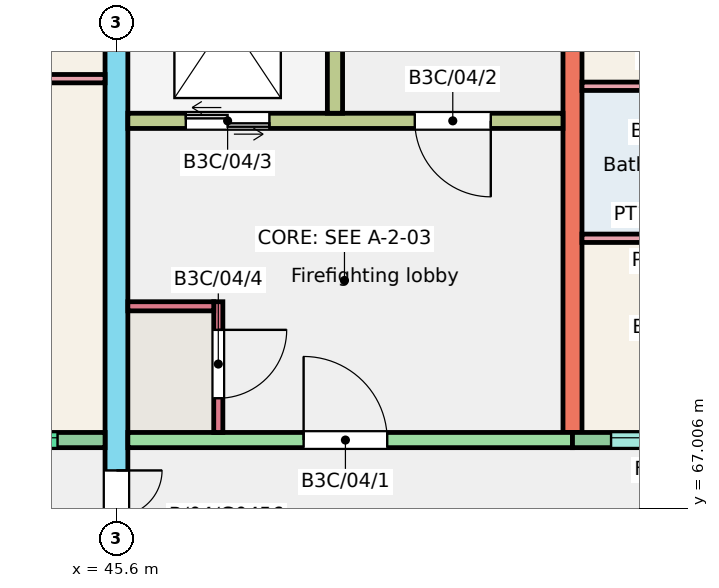
"""IFC4 building model, lengths in metres.
Left out: names, types, materials, properties, quantities, classifications, styles, units other than length and angle.
Written with IfcOpenShell. Run it as: python <this file> out.ifc"""

import sys

from ifc_helpers import new_model, si_unit, direction, frame, frame_2d, origin, place, context, subcontext, project, spatial, rectangle, extrude, element, fill, save


model = new_model("IFC4")
c1 = context("Model", 3, precision=1e-05, world=origin(), true_north=direction((0.0, 1.0)))
c2 = subcontext(c1, "Body", "Model", "MODEL_VIEW")
j1 = project(units=[si_unit("LENGTHUNIT", "METRE"), si_unit("PLANEANGLEUNIT", "RADIAN")], contexts=[c1])
p1 = place(None, origin())
s1 = spatial("IfcSite", under=j1, at=p1, CompositionType="ELEMENT")
p2 = place(p1, origin())
s2 = spatial("IfcBuilding", under=s1, at=p2, CompositionType="ELEMENT")
p3 = place(p2, frame((0.0, 0.0, 12.0)))
s3 = spatial("IfcBuildingStorey", under=s2, at=p3, CompositionType="ELEMENT", Elevation=12.0)
p4 = place(p3, frame((45.6, 66.0, 0.0), z_axis=(0.0, 0.0, 1.0), x_axis=(0.0, 1.0, 0.0)))
e1 = element("IfcWall", 1, at=p4, inside=s3, PredefinedType="SHEAR", context=c2, shape_type="SweptSolid", body=[
    extrude(rectangle(XDim=11.0, YDim=0.3, at=frame_2d((5.5, 0.0))), origin(), (0.0, 0.0, 1.0), 3.0),
])
p5 = place(p4, frame((0.3, 0.0, 0.0)))
e2 = element("IfcOpeningElement", 2, at=p5, cuts=e1, PredefinedType="OPENING", context=c2, shape_type="SweptSolid", body=[
    extrude(rectangle(XDim=1.2, YDim=2.1, at=frame_2d((0.6, 1.05))), frame((0.0, 0.16, 0.0), z_axis=(0.0, -1.0, 0.0), x_axis=(1.0, 0.0, 0.0)), (0.0, 0.0, 1.0), 0.32),
])
p6 = place(p3, frame((51.6, 68.0, 0.0), z_axis=(0.0, 0.0, 1.0), x_axis=(0.0, 1.0, 0.0)))
e3 = element("IfcWall", 3, at=p6, inside=s3, PredefinedType="SHEAR", context=c2, shape_type="SweptSolid", body=[
    extrude(rectangle(XDim=9.0, YDim=0.25, at=frame_2d((4.5, 0.0))), origin(), (0.0, 0.0, 1.0), 3.0),
])
p7 = place(p3, frame((42.0, 67.9, 0.0), z_axis=(0.0, 0.0, 1.0), x_axis=(1.0, 0.0, 0.0)))
e4 = element("IfcWall", 4, at=p7, inside=s3, PredefinedType="SOLIDWALL", context=c2, shape_type="SweptSolid", body=[
    extrude(rectangle(XDim=3.45, YDim=0.2, at=frame_2d((1.725, 0.0))), origin(), (0.0, 0.0, 1.0), 3.0),
])
p8 = place(p7, frame((0.725, 0.0, 1.2)))
e5 = element("IfcOpeningElement", 5, at=p8, cuts=e4, PredefinedType="OPENING", context=c2, shape_type="SweptSolid", body=[
    extrude(rectangle(XDim=2.1, YDim=1.2, at=frame_2d((1.05, 0.6))), frame((0.0, 0.11, 0.0), z_axis=(0.0, -1.0, 0.0), x_axis=(1.0, 0.0, 0.0)), (0.0, 0.0, 1.0), 0.22),
])
p9 = place(p3, frame((45.75, 67.9, 0.0), z_axis=(0.0, 0.0, 1.0), x_axis=(1.0, 0.0, 0.0)))
e6 = element("IfcWall", 6, at=p9, inside=s3, PredefinedType="SHEAR", context=c2, shape_type="SweptSolid", body=[
    extrude(rectangle(XDim=5.85, YDim=0.2, at=frame_2d((2.925, 0.0))), origin(), (0.0, 0.0, 1.0), 3.0),
])
p10 = place(p9, frame((2.312, 0.0, 0.0)))
e7 = element("IfcOpeningElement", 7, at=p10, cuts=e6, PredefinedType="OPENING", context=c2, shape_type="SweptSolid", body=[
    extrude(rectangle(XDim=1.1, YDim=2.1, at=frame_2d((0.55, 1.05))), frame((0.0, 0.11, 0.0), z_axis=(0.0, -1.0, 0.0), x_axis=(1.0, 0.0, 0.0)), (0.0, 0.0, 1.0), 0.22),
])
p11 = place(p3, frame((45.75, 72.1, 0.0), z_axis=(0.0, 0.0, 1.0), x_axis=(1.0, 0.0, 0.0)))
e8 = element("IfcWall", 8, at=p11, inside=s3, PredefinedType="SHEAR", context=c2, shape_type="SweptSolid", body=[
    extrude(rectangle(XDim=5.725, YDim=0.2, at=frame_2d((2.863, 0.0))), origin(), (0.0, 0.0, 1.0), 3.0),
])
p12 = place(p11, frame((3.775, 0.0, 0.0)))
e9 = element("IfcOpeningElement", 9, at=p12, cuts=e8, PredefinedType="OPENING", context=c2, shape_type="SweptSolid", body=[
    extrude(rectangle(XDim=1.0, YDim=2.1, at=frame_2d((0.5, 1.05))), frame((0.0, 0.11, 0.0), z_axis=(0.0, -1.0, 0.0), x_axis=(1.0, 0.0, 0.0)), (0.0, 0.0, 1.0), 0.22),
])
p13 = place(p11, frame((0.762, 0.0, 0.0)))
e10 = element("IfcOpeningElement", 10, at=p13, cuts=e8, PredefinedType="OPENING", context=c2, shape_type="SweptSolid", body=[
    extrude(rectangle(XDim=1.1, YDim=2.1, at=frame_2d((0.55, 1.05))), frame((0.0, 0.11, 0.0), z_axis=(0.0, -1.0, 0.0), x_axis=(1.0, 0.0, 0.0)), (0.0, 0.0, 1.0), 0.22),
])
p14 = place(p3, frame((48.475, 72.2, 0.0), z_axis=(0.0, 0.0, 1.0), x_axis=(0.0, 1.0, 0.0)))
e11 = element("IfcWall", 11, at=p14, inside=s3, PredefinedType="SHEAR", context=c2, shape_type="SweptSolid", body=[
    extrude(rectangle(XDim=4.8, YDim=0.2, at=frame_2d((2.4, 0.0))), origin(), (0.0, 0.0, 1.0), 3.0),
])
p15 = place(p3, frame((46.94, 68.0, 0.0), z_axis=(0.0, 0.0, 1.0), x_axis=(0.0, 1.0, 0.0)))
e12 = element("IfcWall", 12, at=p15, inside=s3, PredefinedType="SHEAR", context=c2, shape_type="SweptSolid", body=[
    extrude(rectangle(XDim=1.72, YDim=0.12, at=frame_2d((0.86, 0.0))), origin(), (0.0, 0.0, 1.0), 3.0),
])
p16 = place(p15, frame((0.45, 0.0, 0.0)))
e13 = element("IfcOpeningElement", 13, at=p16, cuts=e12, PredefinedType="OPENING", context=c2, shape_type="SweptSolid", body=[
    extrude(rectangle(XDim=0.9, YDim=2.1, at=frame_2d((0.45, 1.05))), frame((0.0, 0.07, 0.0), z_axis=(0.0, -1.0, 0.0), x_axis=(1.0, 0.0, 0.0)), (0.0, 0.0, 1.0), 0.14),
])
p17 = place(p3, frame((45.75, 69.66, 0.0), z_axis=(0.0, 0.0, 1.0), x_axis=(1.0, 0.0, 0.0)))
e14 = element("IfcWall", 14, at=p17, inside=s3, PredefinedType="SHEAR", context=c2, shape_type="SweptSolid", body=[
    extrude(rectangle(XDim=1.13, YDim=0.12, at=frame_2d((0.565, 0.0))), origin(), (0.0, 0.0, 1.0), 3.0),
])
p18 = place(p3, frame((51.6, 67.9, 0.0), z_axis=(0.0, 0.0, 1.0), x_axis=(1.0, 0.0, 0.0)))
e15 = element("IfcWall", 15, at=p18, inside=s3, PredefinedType="SOLIDWALL", context=c2, shape_type="SweptSolid", body=[
    extrude(rectangle(XDim=3.6, YDim=0.2, at=frame_2d((1.8, 0.0))), origin(), (0.0, 0.0, 1.0), 3.0),
])
p19 = place(p18, frame((0.508, 0.0, 1.1)))
e16 = element("IfcOpeningElement", 16, at=p19, cuts=e15, PredefinedType="OPENING", context=c2, shape_type="SweptSolid", body=[
    extrude(rectangle(XDim=1.2, YDim=1.3, at=frame_2d((0.6, 0.65))), frame((0.0, 0.11, 0.0), z_axis=(0.0, -1.0, 0.0), x_axis=(1.0, 0.0, 0.0)), (0.0, 0.0, 1.0), 0.22),
])
p20 = place(p18, frame((2.35, 0.0, 0.0)))
e17 = element("IfcOpeningElement", 17, at=p20, cuts=e15, PredefinedType="OPENING", context=c2, shape_type="SweptSolid", body=[
    extrude(rectangle(XDim=1.0, YDim=2.1, at=frame_2d((0.5, 1.05))), frame((0.0, 0.11, 0.0), z_axis=(0.0, -1.0, 0.0), x_axis=(1.0, 0.0, 0.0)), (0.0, 0.0, 1.0), 0.22),
])
p21 = place(p3, frame((42.1, 72.655, 0.0), z_axis=(0.0, 0.0, 1.0), x_axis=(1.0, 0.0, 0.0)))
e18 = element("IfcWall", 18, at=p21, inside=s3, PredefinedType="PARTITIONING", context=c2, shape_type="SweptSolid", body=[
    extrude(rectangle(XDim=3.35, YDim=0.11, at=frame_2d((1.675, 0.0))), origin(), (0.0, 0.0, 1.0), 2.8),
])
p22 = place(p3, frame((51.725, 70.555, 0.0), z_axis=(0.0, 0.0, 1.0), x_axis=(1.0, 0.0, 0.0)))
e19 = element("IfcWall", 19, at=p22, inside=s3, PredefinedType="PARTITIONING", context=c2, shape_type="SweptSolid", body=[
    extrude(rectangle(XDim=1.965, YDim=0.11, at=frame_2d((0.982, 0.0))), origin(), (0.0, 0.0, 1.0), 2.8),
])
p23 = place(p3, frame((51.725, 72.555, 0.0), z_axis=(0.0, 0.0, 1.0), x_axis=(1.0, 0.0, 0.0)))
e20 = element("IfcWall", 20, at=p23, inside=s3, PredefinedType="PARTITIONING", context=c2, shape_type="SweptSolid", body=[
    extrude(rectangle(XDim=3.375, YDim=0.11, at=frame_2d((1.688, 0.0))), origin(), (0.0, 0.0, 1.0), 2.8),
])
p24 = place(p23, frame((2.275, 0.0, 0.0)))
e21 = element("IfcOpeningElement", 21, at=p24, cuts=e20, PredefinedType="OPENING", context=c2, shape_type="SweptSolid", body=[
    extrude(rectangle(XDim=0.9, YDim=2.1, at=frame_2d((0.45, 1.05))), frame((0.0, 0.065, 0.0), z_axis=(0.0, -1.0, 0.0), x_axis=(1.0, 0.0, 0.0)), (0.0, 0.0, 1.0), 0.13),
])
p25 = place(p8, origin())
e22 = element("IfcWindow", 22, at=p25, inside=s3, PartitioningType="SINGLE_PANEL", PredefinedType="WINDOW", context=c2, shape_type="SweptSolid", body=[
    extrude(rectangle(XDim=2.1, YDim=1.2, at=frame_2d((1.05, 0.6))), frame((0.0, 0.06, 0.0), z_axis=(0.0, -1.0, 0.0), x_axis=(1.0, 0.0, 0.0)), (0.0, 0.0, 1.0), 0.06),
])
fill(e5, e22)
p26 = place(p19, origin())
e23 = element("IfcWindow", 23, at=p26, inside=s3, PartitioningType="SINGLE_PANEL", PredefinedType="WINDOW", context=c2, shape_type="SweptSolid", body=[
    extrude(rectangle(XDim=1.2, YDim=1.3, at=frame_2d((0.6, 0.65))), frame((0.0, 0.06, 0.0), z_axis=(0.0, -1.0, 0.0), x_axis=(1.0, 0.0, 0.0)), (0.0, 0.0, 1.0), 0.06),
])
fill(e16, e23)
p27 = place(p10, origin())
e24 = element("IfcDoor", 24, at=p27, inside=s3, OperationType="SINGLE_SWING_LEFT", PredefinedType="DOOR", context=c2, shape_type="SweptSolid", body=[
    extrude(rectangle(XDim=1.1, YDim=2.1, at=frame_2d((0.55, 1.05))), frame((0.0, 0.025, 0.0), z_axis=(0.0, -1.0, 0.0), x_axis=(1.0, 0.0, 0.0)), (0.0, 0.0, 1.0), 0.05),
])
fill(e7, e24)
p28 = place(p12, origin())
e25 = element("IfcDoor", 25, at=p28, inside=s3, OperationType="SINGLE_SWING_RIGHT", PredefinedType="DOOR", context=c2, shape_type="SweptSolid", body=[
    extrude(rectangle(XDim=1.0, YDim=2.1, at=frame_2d((0.5, 1.05))), frame((0.0, 0.025, 0.0), z_axis=(0.0, -1.0, 0.0), x_axis=(1.0, 0.0, 0.0)), (0.0, 0.0, 1.0), 0.05),
])
fill(e9, e25)
p29 = place(p13, origin())
e26 = element("IfcDoor", 26, at=p29, inside=s3, OperationType="DOUBLE_DOOR_SLIDING", PredefinedType="DOOR", context=c2, shape_type="SweptSolid", body=[
    extrude(rectangle(XDim=1.1, YDim=2.1, at=frame_2d((0.55, 1.05))), frame((0.0, 0.025, 0.0), z_axis=(0.0, -1.0, 0.0), x_axis=(1.0, 0.0, 0.0)), (0.0, 0.0, 1.0), 0.05),
])
fill(e10, e26)
p30 = place(p16, origin())
e27 = element("IfcDoor", 27, at=p30, inside=s3, OperationType="SINGLE_SWING_RIGHT", PredefinedType="DOOR", context=c2, shape_type="SweptSolid", body=[
    extrude(rectangle(XDim=0.9, YDim=2.1, at=frame_2d((0.45, 1.05))), frame((0.0, 0.025, 0.0), z_axis=(0.0, -1.0, 0.0), x_axis=(1.0, 0.0, 0.0)), (0.0, 0.0, 1.0), 0.05),
])
fill(e13, e27)
p31 = place(p5, origin())
e28 = element("IfcDoor", 28, at=p31, inside=s3, OperationType="DOUBLE_DOOR_SINGLE_SWING", PredefinedType="DOOR", context=c2, shape_type="SweptSolid", body=[
    extrude(rectangle(XDim=1.2, YDim=2.1, at=frame_2d((0.6, 1.05))), frame((0.0, 0.025, 0.0), z_axis=(0.0, -1.0, 0.0), x_axis=(1.0, 0.0, 0.0)), (0.0, 0.0, 1.0), 0.05),
])
fill(e2, e28)
save(model, sys.argv[1])
